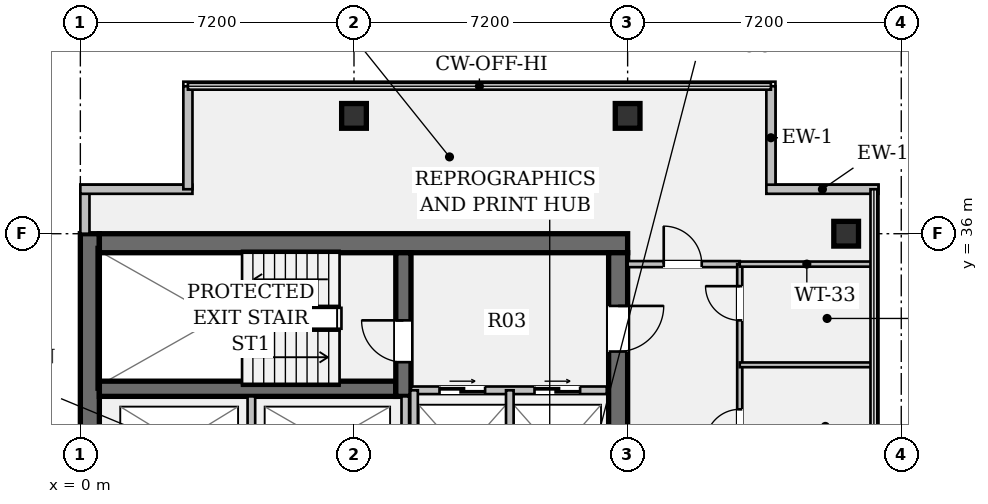
"""IFC4 building model, lengths in metres.
Left out: names, types, materials, properties, quantities, classifications, styles, units other than length and angle.
Written with IfcOpenShell. Run it as: python <this file> out.ifc"""

import sys

from ifc_helpers import new_model, si_unit, direction, frame, frame_2d, origin, origin_2d, place, context, subcontext, project, spatial, rectangle, hollow_rectangle, extrude, element, fill, save


model = new_model("IFC4")
c1 = context("Model", 3, precision=1e-05, world=origin(), true_north=direction((0.0, 1.0)))
c2 = subcontext(c1, "Body", "Model", "MODEL_VIEW")
j1 = project(units=[si_unit("LENGTHUNIT", "METRE"), si_unit("PLANEANGLEUNIT", "RADIAN")], contexts=[c1])
p1 = place(None, origin())
s1 = spatial("IfcSite", under=j1, at=p1, CompositionType="ELEMENT")
p2 = place(p1, origin())
s2 = spatial("IfcBuilding", under=s1, at=p2, CompositionType="ELEMENT")
p3 = place(p2, frame((0.0, 0.0, 290.15)))
s3 = spatial("IfcBuildingStorey", under=s2, at=p3, CompositionType="ELEMENT", Elevation=290.15)
p4 = place(p3, frame((0.25, 7.2, 0.0), z_axis=(0.0, 0.0, 1.0), x_axis=(0.0, 1.0, 0.0)))
e1 = element("IfcWall", 1, at=p4, inside=s3, PredefinedType="SHEAR", context=c2, shape_type="SweptSolid", body=[
    extrude(rectangle(XDim=28.8, YDim=0.5, at=frame_2d((14.4, 0.0))), origin(), (0.0, 0.0, 1.0), 3.24),
])
p5 = place(p3, frame((0.5, 35.75, 0.0), z_axis=(0.0, 0.0, 1.0), x_axis=(1.0, 0.0, 0.0)))
e2 = element("IfcWall", 2, at=p5, inside=s3, PredefinedType="SHEAR", context=c2, shape_type="SweptSolid", body=[
    extrude(rectangle(XDim=13.9, YDim=0.5, at=frame_2d((6.95, 0.0))), origin(), (0.0, 0.0, 1.0), 3.24),
])
p6 = place(p3, frame((14.15, 35.5, 0.0), z_axis=(0.0, 0.0, 1.0), x_axis=(0.0, -1.0, 0.0)))
e3 = element("IfcWall", 3, at=p6, inside=s3, PredefinedType="SHEAR", context=c2, shape_type="SweptSolid", body=[
    extrude(rectangle(XDim=27.8, YDim=0.5, at=frame_2d((13.9, 0.0))), origin(), (0.0, 0.0, 1.0), 3.24),
])
p7 = place(p6, frame((1.4, 0.0, 0.0)))
e4 = element("IfcOpeningElement", 4, at=p7, cuts=e3, PredefinedType="OPENING", context=c2, shape_type="SweptSolid", body=[
    extrude(rectangle(XDim=1.2, YDim=2.15, at=frame_2d((0.6, 1.075))), frame((0.0, 0.262, 0.0), z_axis=(0.0, -1.0, 0.0), x_axis=(1.0, 0.0, 0.0)), (0.0, 0.0, 1.0), 0.524),
])
p8 = place(p6, frame((25.35, 0.0, 0.0)))
e5 = element("IfcOpeningElement", 5, at=p8, cuts=e3, PredefinedType="OPENING", context=c2, shape_type="SweptSolid", body=[
    extrude(rectangle(XDim=1.2, YDim=2.15, at=frame_2d((0.6, 1.075))), frame((0.0, 0.262, 0.0), z_axis=(0.0, -1.0, 0.0), x_axis=(1.0, 0.0, 0.0)), (0.0, 0.0, 1.0), 0.524),
])
p9 = place(p6, frame((14.7, 0.0, 0.0)))
e6 = element("IfcOpeningElement", 6, at=p9, cuts=e3, PredefinedType="OPENING", context=c2, shape_type="SweptSolid", body=[
    extrude(rectangle(XDim=1.6, YDim=2.2, at=frame_2d((0.8, 1.1))), frame((0.0, 0.262, 0.0), z_axis=(0.0, -1.0, 0.0), x_axis=(1.0, 0.0, 0.0)), (0.0, 0.0, 1.0), 0.524),
])
p10 = place(p3, frame((0.5, 31.92, 0.0), z_axis=(0.0, 0.0, 1.0), x_axis=(1.0, 0.0, 0.0)))
e7 = element("IfcWall", 7, at=p10, inside=s3, PredefinedType="SHEAR", context=c2, shape_type="SweptSolid", body=[
    extrude(rectangle(XDim=7.8, YDim=0.4, at=frame_2d((3.9, 0.0))), origin(), (0.0, 0.0, 1.0), 3.24),
])
p11 = place(p3, frame((8.5, 31.72, 0.0), z_axis=(0.0, 0.0, 1.0), x_axis=(0.0, 1.0, 0.0)))
e8 = element("IfcWall", 8, at=p11, inside=s3, PredefinedType="SHEAR", context=c2, shape_type="SweptSolid", body=[
    extrude(rectangle(XDim=3.78, YDim=0.4, at=frame_2d((1.89, 0.0))), origin(), (0.0, 0.0, 1.0), 3.24),
])
p12 = place(p11, frame((0.9, 0.0, 0.0)))
e9 = element("IfcOpeningElement", 9, at=p12, cuts=e8, PredefinedType="OPENING", context=c2, shape_type="SweptSolid", body=[
    extrude(rectangle(XDim=1.1, YDim=2.15, at=frame_2d((0.55, 1.075))), frame((0.0, 0.212, 0.0), z_axis=(0.0, -1.0, 0.0), x_axis=(1.0, 0.0, 0.0)), (0.0, 0.0, 1.0), 0.424),
])
for number, where, z_axis, x_axis in (
    (10, (7.2, 39.1, 0.0), (0.0, 0.0, 1.0), (1.0, 0.0, 0.0)),
    (11, (14.4, 39.1, 0.0), (0.0, 0.0, 1.0), (1.0, 0.0, 0.0)),
    (12, (20.15, 36.0, 0.0), (0.0, 0.0, 1.0), (1.0, 0.0, 0.0)),
):
    element("IfcColumn", number, at=place(p3, frame(where, z_axis=z_axis, x_axis=x_axis)), inside=s3, PredefinedType="COLUMN", context=c2, shape_type="SweptSolid", body=[
        extrude(hollow_rectangle(XDim=0.65, YDim=0.65, WallThickness=0.04, at=origin_2d()), origin(), (0.0, 0.0, 1.0), 3.24),
    ])
p13 = place(p3, frame((0.12, 36.0, 0.0), z_axis=(0.0, 0.0, 1.0), x_axis=(0.0, 1.0, 0.0)))
e13 = element("IfcWall", 13, at=p13, inside=s3, PredefinedType="STANDARD", context=c2, shape_type="SweptSolid", body=[
    extrude(rectangle(XDim=1.17, YDim=0.24, at=frame_2d((0.585, 0.0))), origin(), (0.0, 0.0, 1.0), 3.24),
])
p14 = place(p3, frame((0.0, 37.17, 0.0), z_axis=(0.0, 0.0, 1.0), x_axis=(1.0, 0.0, 0.0)))
e14 = element("IfcWall", 14, at=p14, inside=s3, PredefinedType="STANDARD", context=c2, shape_type="SweptSolid", body=[
    extrude(rectangle(XDim=2.95, YDim=0.24, at=frame_2d((1.475, 0.0))), origin(), (0.0, 0.0, 1.0), 3.24),
])
for number, where, z_axis, x_axis in (
    (15, (2.83, 37.17, 0.0), (0.0, 0.0, 1.0), (0.0, 1.0, 0.0)),
    (16, (18.17, 39.88, 0.0), (0.0, 0.0, 1.0), (0.0, -1.0, 0.0)),
):
    element("IfcWall", number, at=place(p3, frame(where, z_axis=z_axis, x_axis=x_axis)), inside=s3, PredefinedType="STANDARD", context=c2, shape_type="SweptSolid", body=[
        extrude(rectangle(XDim=2.71, YDim=0.24, at=frame_2d((1.355, 0.0))), origin(), (0.0, 0.0, 1.0), 3.24),
    ])
p15 = place(p3, frame((18.05, 37.17, 0.0), z_axis=(0.0, 0.0, 1.0), x_axis=(1.0, 0.0, 0.0)))
e17 = element("IfcWall", 17, at=p15, inside=s3, PredefinedType="STANDARD", context=c2, shape_type="SweptSolid", body=[
    extrude(rectangle(XDim=2.95, YDim=0.24, at=frame_2d((1.475, 0.0))), origin(), (0.0, 0.0, 1.0), 3.24),
])
p16 = place(p3, frame((8.7, 31.88, 0.0), z_axis=(0.0, 0.0, 1.0), x_axis=(1.0, 0.0, 0.0)))
e18 = element("IfcWall", 18, at=p16, inside=s3, PredefinedType="PARTITIONING", context=c2, shape_type="SweptSolid", body=[
    extrude(rectangle(XDim=5.15, YDim=0.2, at=frame_2d((2.575, 0.0))), origin(), (0.0, 0.0, 1.0), 3.24),
])
p17 = place(p16, frame((0.75, 0.0, 0.0)))
e19 = element("IfcOpeningElement", 19, at=p17, cuts=e18, PredefinedType="OPENING", context=c2, shape_type="SweptSolid", body=[
    extrude(rectangle(XDim=1.2, YDim=2.2, at=frame_2d((0.6, 1.1))), frame((0.0, 0.112, 0.0), z_axis=(0.0, -1.0, 0.0), x_axis=(1.0, 0.0, 0.0)), (0.0, 0.0, 1.0), 0.224),
])
p18 = place(p16, frame((3.25, 0.0, 0.0)))
e20 = element("IfcOpeningElement", 20, at=p18, cuts=e18, PredefinedType="OPENING", context=c2, shape_type="SweptSolid", body=[
    extrude(rectangle(XDim=1.2, YDim=2.2, at=frame_2d((0.6, 1.1))), frame((0.0, 0.112, 0.0), z_axis=(0.0, -1.0, 0.0), x_axis=(1.0, 0.0, 0.0)), (0.0, 0.0, 1.0), 0.224),
])
for number, where, z_axis, x_axis in (
    (21, (8.78, 28.78, 0.0), (0.0, 0.0, 1.0), (0.0, 1.0, 0.0)),
    (22, (11.3, 28.78, 0.0), (0.0, 0.0, 1.0), (0.0, 1.0, 0.0)),
):
    element("IfcWall", number, at=place(p3, frame(where, z_axis=z_axis, x_axis=x_axis)), inside=s3, PredefinedType="PARTITIONING", context=c2, shape_type="SweptSolid", body=[
        extrude(rectangle(XDim=3.1, YDim=0.2, at=frame_2d((1.55, 0.0))), origin(), (0.0, 0.0, 1.0), 3.24),
    ])
for number, where, z_axis, x_axis in (
    (23, (4.5, 28.78, 0.0), (0.0, 0.0, 1.0), (0.0, 1.0, 0.0)),
    (24, (8.55, 28.78, 0.0), (0.0, 0.0, 1.0), (0.0, 1.0, 0.0)),
):
    element("IfcWall", number, at=place(p3, frame(where, z_axis=z_axis, x_axis=x_axis)), inside=s3, PredefinedType="PARTITIONING", context=c2, shape_type="SweptSolid", body=[
        extrude(rectangle(XDim=2.94, YDim=0.2, at=frame_2d((1.47, 0.0))), origin(), (0.0, 0.0, 1.0), 3.24),
    ])
p19 = place(p3, frame((14.4, 35.2, 0.0), z_axis=(0.0, 0.0, 1.0), x_axis=(1.0, 0.0, 0.0)))
e25 = element("IfcWall", 25, at=p19, inside=s3, PredefinedType="PARTITIONING", context=c2, shape_type="SweptSolid", body=[
    extrude(rectangle(XDim=2.95, YDim=0.16, at=frame_2d((1.475, 0.0))), origin(), (0.0, 0.0, 1.0), 3.24),
])
p20 = place(p19, frame((0.95, 0.0, 0.0)))
e26 = element("IfcOpeningElement", 26, at=p20, cuts=e25, PredefinedType="OPENING", context=c2, shape_type="SweptSolid", body=[
    extrude(rectangle(XDim=1.0, YDim=2.15, at=frame_2d((0.5, 1.075))), frame((0.0, 0.092, 0.0), z_axis=(0.0, -1.0, 0.0), x_axis=(1.0, 0.0, 0.0)), (0.0, 0.0, 1.0), 0.184),
])
p21 = place(p3, frame((17.35, 12.55, 0.0), z_axis=(0.0, 0.0, 1.0), x_axis=(0.0, 1.0, 0.0)))
e27 = element("IfcWall", 27, at=p21, inside=s3, PredefinedType="PARTITIONING", context=c2, shape_type="SweptSolid", body=[
    extrude(rectangle(XDim=22.65, YDim=0.135, at=frame_2d((11.325, 0.0))), origin(), (0.0, 0.0, 1.0), 2.676),
])
p22 = place(p21, frame((11.43, 0.0, 0.0)))
e28 = element("IfcOpeningElement", 28, at=p22, cuts=e27, PredefinedType="OPENING", context=c2, shape_type="SweptSolid", body=[
    extrude(rectangle(XDim=0.9, YDim=2.15, at=frame_2d((0.45, 1.075))), frame((0.0, 0.08, 0.0), z_axis=(0.0, -1.0, 0.0), x_axis=(1.0, 0.0, 0.0)), (0.0, 0.0, 1.0), 0.159),
])
p23 = place(p21, frame((14.68, 0.0, 0.0)))
e29 = element("IfcOpeningElement", 29, at=p23, cuts=e27, PredefinedType="OPENING", context=c2, shape_type="SweptSolid", body=[
    extrude(rectangle(XDim=0.9, YDim=2.15, at=frame_2d((0.45, 1.075))), frame((0.0, 0.08, 0.0), z_axis=(0.0, -1.0, 0.0), x_axis=(1.0, 0.0, 0.0)), (0.0, 0.0, 1.0), 0.159),
])
p24 = place(p21, frame((17.93, 0.0, 0.0)))
e30 = element("IfcOpeningElement", 30, at=p24, cuts=e27, PredefinedType="OPENING", context=c2, shape_type="SweptSolid", body=[
    extrude(rectangle(XDim=0.9, YDim=2.15, at=frame_2d((0.45, 1.075))), frame((0.0, 0.08, 0.0), z_axis=(0.0, -1.0, 0.0), x_axis=(1.0, 0.0, 0.0)), (0.0, 0.0, 1.0), 0.159),
])
p25 = place(p21, frame((21.17, 0.0, 0.0)))
e31 = element("IfcOpeningElement", 31, at=p25, cuts=e27, PredefinedType="OPENING", context=c2, shape_type="SweptSolid", body=[
    extrude(rectangle(XDim=0.9, YDim=2.15, at=frame_2d((0.45, 1.075))), frame((0.0, 0.08, 0.0), z_axis=(0.0, -1.0, 0.0), x_axis=(1.0, 0.0, 0.0)), (0.0, 0.0, 1.0), 0.159),
])
p26 = place(p3, frame((17.35, 35.2, 0.0), z_axis=(0.0, 0.0, 1.0), x_axis=(1.0, 0.0, 0.0)))
e32 = element("IfcWall", 32, at=p26, inside=s3, PredefinedType="PARTITIONING", context=c2, shape_type="SweptSolid", body=[
    extrude(rectangle(XDim=3.53, YDim=0.135, at=frame_2d((1.765, 0.0))), origin(), (0.0, 0.0, 1.0), 3.24),
])
p27 = place(p3, frame((20.9, 22.7, 0.0), z_axis=(0.0, 0.0, 1.0), x_axis=(0.0, 1.0, 0.0)))
e33 = element("IfcWall", 33, at=p27, inside=s3, PredefinedType="PARTITIONING", context=c2, shape_type="SweptSolid", body=[
    extrude(rectangle(XDim=12.5, YDim=0.16, at=frame_2d((6.25, 0.0))), origin(), (0.0, 0.0, 1.0), 3.24),
])
p28 = place(p3, frame((17.35, 32.55, 0.0), z_axis=(0.0, 0.0, 1.0), x_axis=(1.0, 0.0, 0.0)))
e34 = element("IfcWall", 34, at=p28, inside=s3, PredefinedType="PARTITIONING", context=c2, shape_type="SweptSolid", body=[
    extrude(rectangle(XDim=3.55, YDim=0.125, at=frame_2d((1.775, 0.0))), origin(), (0.0, 0.0, 1.0), 3.24),
])
p29 = place(p12, origin())
e35 = element("IfcDoor", 35, at=p29, inside=s3, OperationType="SINGLE_SWING_RIGHT", PredefinedType="DOOR", context=c2, shape_type="SweptSolid", body=[
    extrude(rectangle(XDim=1.1, YDim=2.15, at=frame_2d((0.55, 1.075))), frame((0.0, 0.025, 0.0), z_axis=(0.0, -1.0, 0.0), x_axis=(1.0, 0.0, 0.0)), (0.0, 0.0, 1.0), 0.05),
])
fill(e9, e35)
p30 = place(p7, origin())
e36 = element("IfcDoor", 36, at=p30, inside=s3, OperationType="SINGLE_SWING_LEFT", PredefinedType="DOOR", context=c2, shape_type="SweptSolid", body=[
    extrude(rectangle(XDim=1.2, YDim=2.15, at=frame_2d((0.6, 1.075))), frame((0.0, 0.025, 0.0), z_axis=(0.0, -1.0, 0.0), x_axis=(1.0, 0.0, 0.0)), (0.0, 0.0, 1.0), 0.05),
])
fill(e4, e36)
p31 = place(p17, origin())
e37 = element("IfcDoor", 37, at=p31, inside=s3, OperationType="DOUBLE_DOOR_SLIDING", PredefinedType="DOOR", context=c2, shape_type="SweptSolid", body=[
    extrude(rectangle(XDim=1.2, YDim=2.2, at=frame_2d((0.6, 1.1))), frame((0.0, 0.025, 0.0), z_axis=(0.0, -1.0, 0.0), x_axis=(1.0, 0.0, 0.0)), (0.0, 0.0, 1.0), 0.05),
])
fill(e19, e37)
p32 = place(p18, origin())
e38 = element("IfcDoor", 38, at=p32, inside=s3, OperationType="DOUBLE_DOOR_SLIDING", PredefinedType="DOOR", context=c2, shape_type="SweptSolid", body=[
    extrude(rectangle(XDim=1.2, YDim=2.2, at=frame_2d((0.6, 1.1))), frame((0.0, 0.025, 0.0), z_axis=(0.0, -1.0, 0.0), x_axis=(1.0, 0.0, 0.0)), (0.0, 0.0, 1.0), 0.05),
])
fill(e20, e38)
p33 = place(p20, origin())
e39 = element("IfcDoor", 39, at=p33, inside=s3, OperationType="SINGLE_SWING_LEFT", PredefinedType="DOOR", context=c2, shape_type="SweptSolid", body=[
    extrude(rectangle(XDim=1.0, YDim=2.15, at=frame_2d((0.5, 1.075))), frame((0.0, 0.025, 0.0), z_axis=(0.0, -1.0, 0.0), x_axis=(1.0, 0.0, 0.0)), (0.0, 0.0, 1.0), 0.05),
])
fill(e26, e39)
p34 = place(p24, origin())
e40 = element("IfcDoor", 40, at=p34, inside=s3, OperationType="SINGLE_SWING_LEFT", PredefinedType="DOOR", context=c2, shape_type="SweptSolid", body=[
    extrude(rectangle(XDim=0.9, YDim=2.15, at=frame_2d((0.45, 1.075))), frame((0.0, 0.025, 0.0), z_axis=(0.0, -1.0, 0.0), x_axis=(1.0, 0.0, 0.0)), (0.0, 0.0, 1.0), 0.05),
])
fill(e30, e40)
p35 = place(p25, origin())
e41 = element("IfcDoor", 41, at=p35, inside=s3, OperationType="SINGLE_SWING_RIGHT", PredefinedType="DOOR", context=c2, shape_type="SweptSolid", body=[
    extrude(rectangle(XDim=0.9, YDim=2.15, at=frame_2d((0.45, 1.075))), frame((0.0, 0.025, 0.0), z_axis=(0.0, -1.0, 0.0), x_axis=(1.0, 0.0, 0.0)), (0.0, 0.0, 1.0), 0.05),
])
fill(e31, e41)
save(model, sys.argv[1])
